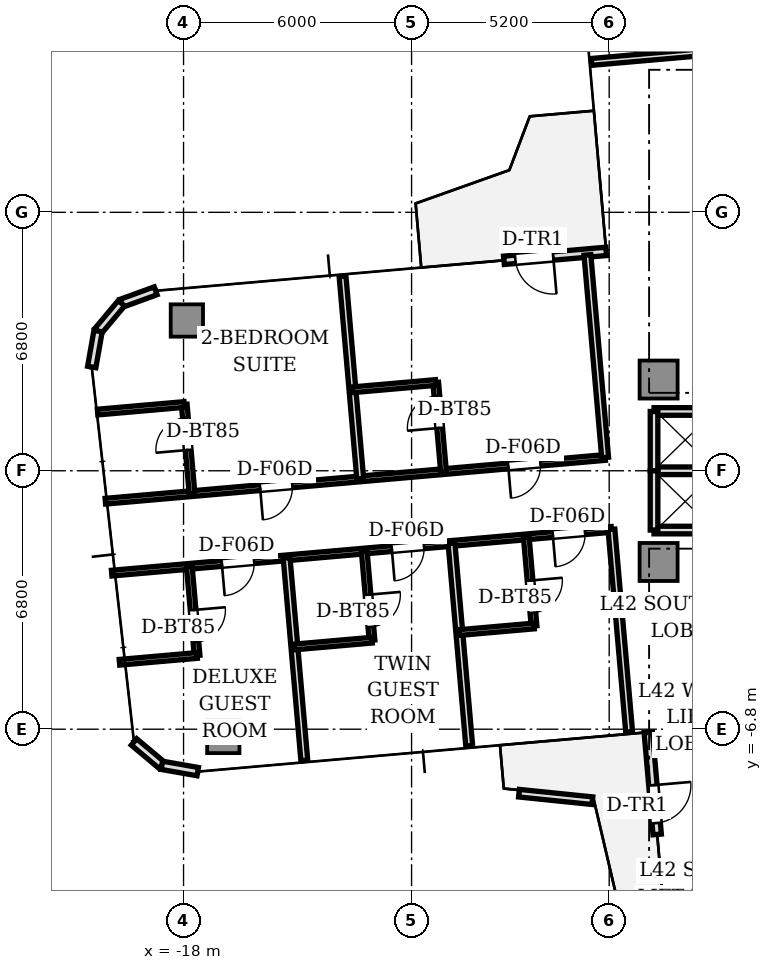
"""IFC4 building model, lengths in metres.
Left out: names, types, materials, properties, quantities, classifications, styles, units other than length and angle.
Written with IfcOpenShell. Run it as: python <this file> out.ifc"""

import sys

from ifc_helpers import new_model, si_unit, direction, frame, frame_2d, origin, origin_2d, place, context, subcontext, project, spatial, rectangle, extrude, source, transform, mapped, element, fill, save


model = new_model("IFC4")
c1 = context("Model", 3, precision=1e-05, world=origin(), true_north=direction((0.0, 1.0)))
c2 = subcontext(c1, "Body", "Model", "MODEL_VIEW")
j1 = project(units=[si_unit("LENGTHUNIT", "METRE"), si_unit("PLANEANGLEUNIT", "RADIAN")], contexts=[c1])
p1 = place(None, origin())
s1 = spatial("IfcSite", under=j1, at=p1, CompositionType="ELEMENT")
p2 = place(p1, origin())
s2 = spatial("IfcBuilding", under=s1, at=p2, CompositionType="ELEMENT")
p3 = place(p2, frame((0.0, 0.0, 153.95)))
s3 = spatial("IfcBuildingStorey", under=s2, at=p3, CompositionType="ELEMENT", Elevation=153.95)
m1 = source(origin(), c2, "Body", "SweptSolid", [
    extrude(rectangle(XDim=1.0, YDim=1.0, at=origin_2d()), origin(), (0.0, 0.0, 1.0), 3.11),
])
for number, where, z_axis, x_axis in (
    (1, (-5.5, 2.4, 0.0), (0.0, 0.0, 1.0), (1.0, 0.0, 0.0)),
    (2, (-5.5, -2.4, 0.0), (0.0, 0.0, 1.0), (1.0, 0.0, 0.0)),
):
    element("IfcColumn", number, at=place(p3, frame(where, z_axis=z_axis, x_axis=x_axis)), inside=s3, PredefinedType="COLUMN", context=c2, shape_type="MappedRepresentation", body=[
        mapped(m1, transform((0.0, 0.0, 0.0), scale=1.0)),
    ])
m2 = source(origin(), c2, "Body", "SweptSolid", [
    extrude(rectangle(XDim=0.85, YDim=0.85, at=origin_2d()), origin(), (0.0, 0.0, 1.0), 3.11),
])
for number, where, z_axis, x_axis in (
    (3, (-17.913, 3.954, 0.0), (0.0, 0.0, 1.0), (1.0, 0.0, 0.0)),
    (4, (-16.954, -7.004, 0.0), (0.0, 0.0, 1.0), (1.0, 0.0, 0.0)),
):
    element("IfcColumn", number, at=place(p3, frame(where, z_axis=z_axis, x_axis=x_axis)), inside=s3, PredefinedType="COLUMN", context=c2, shape_type="MappedRepresentation", body=[
        mapped(m2, transform((0.0, 0.0, 0.0), scale=1.0)),
    ])
p4 = place(p3, frame((-6.879, 5.772, 0.0), z_axis=(0.0, 0.0, 1.0), x_axis=(-0.996193619346, -0.087168071984, 0.0)))
e5 = element("IfcWall", 5, at=p4, inside=s3, PredefinedType="STANDARD", context=c2, shape_type="SweptSolid", body=[
    extrude(rectangle(XDim=2.7, YDim=0.22, at=frame_2d((1.35, 0.0))), origin(), (0.0, 0.0, 1.0), 3.11),
])
p5 = place(p4, frame((1.4, 0.0, 0.0)))
e6 = element("IfcOpeningElement", 6, at=p5, cuts=e5, PredefinedType="OPENING", context=c2, shape_type="SweptSolid", body=[
    extrude(rectangle(XDim=1.0, YDim=2.2, at=frame_2d((0.5, 1.1))), frame((0.0, 0.12, 0.0), z_axis=(0.0, -1.0, 0.0), x_axis=(1.0, 0.0, 0.0)), (0.0, 0.0, 1.0), 0.24),
])
p6 = place(p3, frame((-18.734, 4.735, 0.0), z_axis=(0.0, 0.0, 1.0), x_axis=(-0.939741306239, -0.34188635151, 0.0)))
e7 = element("IfcWall", 7, at=p6, inside=s3, PredefinedType="STANDARD", context=c2, shape_type="SweptSolid", body=[
    extrude(rectangle(XDim=0.958, YDim=0.22, at=frame_2d((0.479, 0.0))), origin(), (0.0, 0.0, 1.0), 3.11),
])
for number, where, z_axis, x_axis in (
    (8, (-19.634, 4.408, 0.0), (0.0, 0.0, 1.0), (-0.643, -0.766, 0.0)),
    (9, (-20.25, 3.674, 0.0), (0.0, 0.0, 1.0), (-0.174, -0.985, 0.0)),
):
    element("IfcWall", number, at=place(p3, frame(where, z_axis=z_axis, x_axis=x_axis)), inside=s3, PredefinedType="STANDARD", context=c2, shape_type="SweptSolid", body=[
        extrude(rectangle(XDim=0.958, YDim=0.22, at=frame_2d((0.479, 0.0))), origin(), (0.0, 0.0, 1.0), 3.11),
    ])
p7 = place(p3, frame((-19.304, -7.135, 0.0), z_axis=(0.0, 0.0, 1.0), x_axis=(0.766001159887, -0.642839189107, 0.0)))
e10 = element("IfcWall", 10, at=p7, inside=s3, PredefinedType="STANDARD", context=c2, shape_type="SweptSolid", body=[
    extrude(rectangle(XDim=0.958, YDim=0.22, at=frame_2d((0.479, 0.0))), origin(), (0.0, 0.0, 1.0), 3.11),
])
p8 = place(p3, frame((-18.57, -7.75, 0.0), z_axis=(0.0, 0.0, 1.0), x_axis=(0.984770724397, -0.173858046606, 0.0)))
e11 = element("IfcWall", 11, at=p8, inside=s3, PredefinedType="STANDARD", context=c2, shape_type="SweptSolid", body=[
    extrude(rectangle(XDim=0.958, YDim=0.22, at=frame_2d((0.479, 0.0))), origin(), (0.0, 0.0, 1.0), 3.11),
])
p9 = place(p3, frame((-5.772, -6.879, 0.0), z_axis=(0.0, 0.0, 1.0), x_axis=(0.087168071984, -0.996193619346, 0.0)))
e12 = element("IfcWall", 12, at=p9, inside=s3, PredefinedType="STANDARD", context=c2, shape_type="SweptSolid", body=[
    extrude(rectangle(XDim=2.7, YDim=0.22, at=frame_2d((1.35, 0.0))), origin(), (0.0, 0.0, 1.0), 3.11),
])
p10 = place(p9, frame((1.4, 0.0, 0.0)))
e13 = element("IfcOpeningElement", 13, at=p10, cuts=e12, PredefinedType="OPENING", context=c2, shape_type="SweptSolid", body=[
    extrude(rectangle(XDim=1.0, YDim=2.2, at=frame_2d((0.5, 1.1))), frame((0.0, 0.12, 0.0), z_axis=(0.0, -1.0, 0.0), x_axis=(1.0, 0.0, 0.0)), (0.0, 0.0, 1.0), 0.24),
])
p11 = place(p3, frame((-9.174, -8.484, 0.0), z_axis=(0.0, 0.0, 1.0), x_axis=(0.994814431637, -0.101706669429, 0.0)))
e14 = element("IfcWall", 14, at=p11, inside=s3, PredefinedType="PARAPET", context=c2, shape_type="SweptSolid", body=[
    extrude(rectangle(XDim=1.942, YDim=0.2, at=frame_2d((0.971, 0.0))), origin(), (0.0, 0.0, 1.0), 0.65),
])
for number, where, z_axis, x_axis in (
    (15, (-5.62, 1.56, 0.0), (0.0, 0.0, 1.0), (1.0, 0.0, 0.0)),
    (16, (-5.62, -1.56, 0.0), (0.0, 0.0, 1.0), (1.0, 0.0, 0.0)),
    (17, (-5.62, 0.0, 0.0), (0.0, 0.0, 1.0), (1.0, 0.0, 0.0)),
):
    element("IfcWall", number, at=place(p3, frame(where, z_axis=z_axis, x_axis=x_axis)), inside=s3, PredefinedType="SOLIDWALL", context=c2, shape_type="SweptSolid", body=[
        extrude(rectangle(XDim=1.64, YDim=0.2, at=frame_2d((0.82, 0.0))), origin(), (0.0, 0.0, 1.0), 2.66),
    ])
for number, where, z_axis, x_axis in (
    (18, (-5.62, 0.0, 0.0), (0.0, 0.0, 1.0), (0.0, 1.0, 0.0)),
    (19, (-5.62, -1.56, 0.0), (0.0, 0.0, 1.0), (0.0, 1.0, 0.0)),
):
    element("IfcWall", number, at=place(p3, frame(where, z_axis=z_axis, x_axis=x_axis)), inside=s3, PredefinedType="SOLIDWALL", context=c2, shape_type="SweptSolid", body=[
        extrude(rectangle(XDim=1.56, YDim=0.2, at=frame_2d((0.78, 0.0))), origin(), (0.0, 0.0, 1.0), 2.66),
    ])
p12 = place(p3, frame((-1.936, 11.224, 0.0), z_axis=(0.0, 0.0, 1.0), x_axis=(-0.996194212812, -0.087161289348, 0.0)))
e20 = element("IfcWall", 20, at=p12, inside=s3, PredefinedType="PARTITIONING", context=c2, shape_type="SweptSolid", body=[
    extrude(rectangle(XDim=5.35, YDim=0.18, at=frame_2d((2.675, 0.0))), origin(), (0.0, 0.0, 1.0), 2.66),
])
p13 = place(p3, frame((-6.741, -1.543, 0.0), z_axis=(0.0, 0.0, 1.0), x_axis=(-0.996195062465, -0.087151577845, 0.0)))
e21 = element("IfcWall", 21, at=p13, inside=s3, PredefinedType="PARTITIONING", context=c2, shape_type="SweptSolid", body=[
    extrude(rectangle(XDim=13.2, YDim=0.15, at=frame_2d((6.6, 0.0))), origin(), (0.0, 0.0, 1.0), 2.66),
])
p14 = place(p13, frame((0.7, 0.0, 0.0)))
e22 = element("IfcOpeningElement", 22, at=p14, cuts=e21, PredefinedType="OPENING", context=c2, shape_type="SweptSolid", body=[
    extrude(rectangle(XDim=0.85, YDim=2.1, at=frame_2d((0.425, 1.05))), frame((0.0, 0.085, 0.0), z_axis=(0.0, -1.0, 0.0), x_axis=(1.0, 0.0, 0.0)), (0.0, 0.0, 1.0), 0.17),
])
p15 = place(p13, frame((4.952, 0.0, 0.0)))
e23 = element("IfcOpeningElement", 23, at=p15, cuts=e21, PredefinedType="OPENING", context=c2, shape_type="SweptSolid", body=[
    extrude(rectangle(XDim=0.85, YDim=2.1, at=frame_2d((0.425, 1.05))), frame((0.0, 0.085, 0.0), z_axis=(0.0, -1.0, 0.0), x_axis=(1.0, 0.0, 0.0)), (0.0, 0.0, 1.0), 0.17),
])
p16 = place(p13, frame((9.44, 0.0, 0.0)))
e24 = element("IfcOpeningElement", 24, at=p16, cuts=e21, PredefinedType="OPENING", context=c2, shape_type="SweptSolid", body=[
    extrude(rectangle(XDim=0.85, YDim=2.1, at=frame_2d((0.425, 1.05))), frame((0.0, 0.085, 0.0), z_axis=(0.0, -1.0, 0.0), x_axis=(1.0, 0.0, 0.0)), (0.0, 0.0, 1.0), 0.17),
])
p17 = place(p3, frame((-6.907, 0.349, 0.0), z_axis=(0.0, 0.0, 1.0), x_axis=(-0.996195062465, -0.087151577845, 0.0)))
e25 = element("IfcWall", 25, at=p17, inside=s3, PredefinedType="PARTITIONING", context=c2, shape_type="SweptSolid", body=[
    extrude(rectangle(XDim=13.2, YDim=0.15, at=frame_2d((6.6, 0.0))), origin(), (0.0, 0.0, 1.0), 2.66),
])
p18 = place(p17, frame((1.71, 0.0, 0.0)))
e26 = element("IfcOpeningElement", 26, at=p18, cuts=e25, PredefinedType="OPENING", context=c2, shape_type="SweptSolid", body=[
    extrude(rectangle(XDim=0.85, YDim=2.1, at=frame_2d((0.425, 1.05))), frame((0.0, 0.085, 0.0), z_axis=(0.0, -1.0, 0.0), x_axis=(1.0, 0.0, 0.0)), (0.0, 0.0, 1.0), 0.17),
])
p19 = place(p17, frame((8.264, 0.0, 0.0)))
e27 = element("IfcOpeningElement", 27, at=p19, cuts=e25, PredefinedType="OPENING", context=c2, shape_type="SweptSolid", body=[
    extrude(rectangle(XDim=0.85, YDim=2.1, at=frame_2d((0.425, 1.05))), frame((0.0, 0.085, 0.0), z_axis=(0.0, -1.0, 0.0), x_axis=(1.0, 0.0, 0.0)), (0.0, 0.0, 1.0), 0.17),
])
for number, where, z_axis, x_axis in (
    (28, (-6.741, -1.543, 0.0), (0.0, 0.0, 1.0), (0.087, -0.996, 0.0)),
    (29, (-7.373, 5.679, 0.0), (0.0, 0.0, 1.0), (0.087, -0.996, 0.0)),
    (30, (-10.949, -1.912, 0.0), (0.0, 0.0, 1.0), (0.087, -0.996, 0.0)),
):
    element("IfcWall", number, at=place(p3, frame(where, z_axis=z_axis, x_axis=x_axis)), inside=s3, PredefinedType="PARTITIONING", context=c2, shape_type="SweptSolid", body=[
        extrude(rectangle(XDim=5.35, YDim=0.18, at=frame_2d((2.675, 0.0))), origin(), (0.0, 0.0, 1.0), 2.66),
    ])
p20 = place(p3, frame((-8.983, -1.74, 0.0), z_axis=(0.0, 0.0, 1.0), x_axis=(0.087224846905, -0.996188649846, 0.0)))
e31 = element("IfcWall", 31, at=p20, inside=s3, PredefinedType="PARTITIONING", context=c2, shape_type="SweptSolid", body=[
    extrude(rectangle(XDim=2.354, YDim=0.15, at=frame_2d((1.177, 0.0))), origin(), (0.0, 0.0, 1.0), 2.66),
])
p21 = place(p20, frame((1.154, 0.0, 0.0)))
e32 = element("IfcOpeningElement", 32, at=p21, cuts=e31, PredefinedType="OPENING", context=c2, shape_type="SweptSolid", body=[
    extrude(rectangle(XDim=0.85, YDim=2.1, at=frame_2d((0.425, 1.05))), frame((0.0, 0.085, 0.0), z_axis=(0.0, -1.0, 0.0), x_axis=(1.0, 0.0, 0.0)), (0.0, 0.0, 1.0), 0.17),
])
p22 = place(p3, frame((-8.777, -4.084, 0.0), z_axis=(0.0, 0.0, 1.0), x_axis=(-0.996191703625, -0.087189962887, 0.0)))
e33 = element("IfcWall", 33, at=p22, inside=s3, PredefinedType="PARTITIONING", context=c2, shape_type="SweptSolid", body=[
    extrude(rectangle(XDim=1.974, YDim=0.15, at=frame_2d((0.987, 0.0))), origin(), (0.0, 0.0, 1.0), 2.66),
])
p23 = place(p3, frame((-15.289, -2.291, 0.0), z_axis=(0.0, 0.0, 1.0), x_axis=(0.087161289348, -0.996194212812, 0.0)))
e34 = element("IfcWall", 34, at=p23, inside=s3, PredefinedType="PARTITIONING", context=c2, shape_type="SweptSolid", body=[
    extrude(rectangle(XDim=5.35, YDim=0.18, at=frame_2d((2.675, 0.0))), origin(), (0.0, 0.0, 1.0), 2.66),
])
p24 = place(p3, frame((-13.246, -2.113, 0.0), z_axis=(0.0, 0.0, 1.0), x_axis=(0.087224846905, -0.996188649846, 0.0)))
e35 = element("IfcWall", 35, at=p24, inside=s3, PredefinedType="PARTITIONING", context=c2, shape_type="SweptSolid", body=[
    extrude(rectangle(XDim=2.354, YDim=0.15, at=frame_2d((1.177, 0.0))), origin(), (0.0, 0.0, 1.0), 2.66),
])
p25 = place(p24, frame((1.154, 0.0, 0.0)))
e36 = element("IfcOpeningElement", 36, at=p25, cuts=e35, PredefinedType="OPENING", context=c2, shape_type="SweptSolid", body=[
    extrude(rectangle(XDim=0.85, YDim=2.1, at=frame_2d((0.425, 1.05))), frame((0.0, 0.085, 0.0), z_axis=(0.0, -1.0, 0.0), x_axis=(1.0, 0.0, 0.0)), (0.0, 0.0, 1.0), 0.17),
])
p26 = place(p3, frame((-13.041, -4.458, 0.0), z_axis=(0.0, 0.0, 1.0), x_axis=(-0.99619307114, -0.087174336889, 0.0)))
e37 = element("IfcWall", 37, at=p26, inside=s3, PredefinedType="PARTITIONING", context=c2, shape_type="SweptSolid", body=[
    extrude(rectangle(XDim=2.05, YDim=0.15, at=frame_2d((1.025, 0.0))), origin(), (0.0, 0.0, 1.0), 2.66),
])
p27 = place(p3, frame((-17.849, -2.515, 0.0), z_axis=(0.0, 0.0, 1.0), x_axis=(0.087121918963, -0.996197656711, 0.0)))
e38 = element("IfcWall", 38, at=p27, inside=s3, PredefinedType="PARTITIONING", context=c2, shape_type="SweptSolid", body=[
    extrude(rectangle(XDim=2.354, YDim=0.15, at=frame_2d((1.177, 0.0))), origin(), (0.0, 0.0, 1.0), 2.66),
])
p28 = place(p27, frame((1.154, 0.0, 0.0)))
e39 = element("IfcOpeningElement", 39, at=p28, cuts=e38, PredefinedType="OPENING", context=c2, shape_type="SweptSolid", body=[
    extrude(rectangle(XDim=0.85, YDim=2.1, at=frame_2d((0.425, 1.05))), frame((0.0, 0.085, 0.0), z_axis=(0.0, -1.0, 0.0), x_axis=(1.0, 0.0, 0.0)), (0.0, 0.0, 1.0), 0.17),
])
p29 = place(p3, frame((-17.644, -4.86, 0.0), z_axis=(0.0, 0.0, 1.0), x_axis=(-0.99619307114, -0.087174336889, 0.0)))
e40 = element("IfcWall", 40, at=p29, inside=s3, PredefinedType="PARTITIONING", context=c2, shape_type="SweptSolid", body=[
    extrude(rectangle(XDim=2.05, YDim=0.15, at=frame_2d((1.025, 0.0))), origin(), (0.0, 0.0, 1.0), 2.66),
])
p30 = place(p3, frame((-13.35, -0.214, 0.0), z_axis=(0.0, 0.0, 1.0), x_axis=(-0.087161289348, 0.996194212812, 0.0)))
e41 = element("IfcWall", 41, at=p30, inside=s3, PredefinedType="PARTITIONING", context=c2, shape_type="SweptSolid", body=[
    extrude(rectangle(XDim=5.35, YDim=0.18, at=frame_2d((2.675, 0.0))), origin(), (0.0, 0.0, 1.0), 2.66),
])
p31 = place(p3, frame((-11.159, -0.023, 0.0), z_axis=(0.0, 0.0, 1.0), x_axis=(-0.087224846905, 0.996188649846, 0.0)))
e42 = element("IfcWall", 42, at=p31, inside=s3, PredefinedType="PARTITIONING", context=c2, shape_type="SweptSolid", body=[
    extrude(rectangle(XDim=2.354, YDim=0.15, at=frame_2d((1.177, 0.0))), origin(), (0.0, 0.0, 1.0), 2.66),
])
p32 = place(p31, frame((1.154, 0.0, 0.0)))
e43 = element("IfcOpeningElement", 43, at=p32, cuts=e42, PredefinedType="OPENING", context=c2, shape_type="SweptSolid", body=[
    extrude(rectangle(XDim=0.85, YDim=2.1, at=frame_2d((0.425, 1.05))), frame((0.0, 0.085, 0.0), z_axis=(0.0, -1.0, 0.0), x_axis=(1.0, 0.0, 0.0)), (0.0, 0.0, 1.0), 0.17),
])
p33 = place(p3, frame((-11.365, 2.322, 0.0), z_axis=(0.0, 0.0, 1.0), x_axis=(-0.996195042958, -0.087151800816, 0.0)))
e44 = element("IfcWall", 44, at=p33, inside=s3, PredefinedType="PARTITIONING", context=c2, shape_type="SweptSolid", body=[
    extrude(rectangle(XDim=2.199, YDim=0.15, at=frame_2d((1.1, 0.0))), origin(), (0.0, 0.0, 1.0), 2.66),
])
p34 = place(p3, frame((-17.776, -0.602, 0.0), z_axis=(0.0, 0.0, 1.0), x_axis=(-0.087224846905, 0.996188649846, 0.0)))
e45 = element("IfcWall", 45, at=p34, inside=s3, PredefinedType="PARTITIONING", context=c2, shape_type="SweptSolid", body=[
    extrude(rectangle(XDim=2.354, YDim=0.15, at=frame_2d((1.177, 0.0))), origin(), (0.0, 0.0, 1.0), 2.63),
])
p35 = place(p34, frame((1.154, 0.0, 0.0)))
e46 = element("IfcOpeningElement", 46, at=p35, cuts=e45, PredefinedType="OPENING", context=c2, shape_type="SweptSolid", body=[
    extrude(rectangle(XDim=0.85, YDim=2.1, at=frame_2d((0.425, 1.05))), frame((0.0, 0.085, 0.0), z_axis=(0.0, -1.0, 0.0), x_axis=(1.0, 0.0, 0.0)), (0.0, 0.0, 1.0), 0.17),
])
p36 = place(p3, frame((-17.981, 1.743, 0.0), z_axis=(0.0, 0.0, 1.0), x_axis=(-0.996196032585, -0.087140488075, 0.0)))
e47 = element("IfcWall", 47, at=p36, inside=s3, PredefinedType="PARTITIONING", context=c2, shape_type="SweptSolid", body=[
    extrude(rectangle(XDim=2.289, YDim=0.15, at=frame_2d((1.145, 0.0))), origin(), (0.0, 0.0, 1.0), 2.66),
])
p37 = place(p3, frame((-5.287, -11.856, 0.0), z_axis=(0.0, 0.0, 1.0), x_axis=(0.996194790044, 0.087154691724, 0.0)))
e48 = element("IfcWall", 48, at=p37, inside=s3, PredefinedType="PARTITIONING", context=c2, shape_type="SweptSolid", body=[
    extrude(rectangle(XDim=12.6, YDim=0.15, at=frame_2d((6.3, 0.0))), origin(), (0.0, 0.0, 1.0), 2.66),
])
p38 = place(p37, frame((5.5, 0.0, 0.0)))
e49 = element("IfcOpeningElement", 49, at=p38, cuts=e48, PredefinedType="OPENING", context=c2, shape_type="SweptSolid", body=[
    extrude(rectangle(XDim=1.6, YDim=2.25, at=frame_2d((0.8, 1.125))), frame((0.0, 0.085, 0.0), z_axis=(0.0, -1.0, 0.0), x_axis=(1.0, 0.0, 0.0)), (0.0, 0.0, 1.0), 0.17),
])
m3 = source(origin(), c2, "Body", "SweptSolid", [
    extrude(rectangle(XDim=1.0, YDim=0.05, at=origin_2d()), origin(), (0.0, 0.0, 1.0), 2.2),
])
p39 = place(p5, frame((0.5, 0.0, 0.0)))
e50 = element("IfcDoor", 50, at=p39, inside=s3, OperationType="SINGLE_SWING_LEFT", PredefinedType="DOOR", context=c2, shape_type="MappedRepresentation", body=[
    mapped(m3, transform((0.0, 0.0, 0.0), scale=1.0)),
])
fill(e6, e50)
p40 = place(p10, frame((0.5, 0.0, 0.0)))
e51 = element("IfcDoor", 51, at=p40, inside=s3, OperationType="SINGLE_SWING_LEFT", PredefinedType="DOOR", context=c2, shape_type="MappedRepresentation", body=[
    mapped(m3, transform((0.0, 0.0, 0.0), scale=1.0)),
])
fill(e13, e51)
m4 = source(origin(), c2, "Body", "SweptSolid", [
    extrude(rectangle(XDim=0.85, YDim=0.05, at=origin_2d()), origin(), (0.0, 0.0, 1.0), 2.1),
])
p41 = place(p21, frame((0.425, 0.0, 0.0)))
e52 = element("IfcDoor", 52, at=p41, inside=s3, OperationType="SINGLE_SWING_LEFT", PredefinedType="DOOR", context=c2, shape_type="MappedRepresentation", body=[
    mapped(m4, transform((0.0, 0.0, 0.0), scale=1.0)),
])
fill(e32, e52)
p42 = place(p14, frame((0.425, 0.0, 0.0)))
e53 = element("IfcDoor", 53, at=p42, inside=s3, OperationType="SINGLE_SWING_RIGHT", PredefinedType="DOOR", context=c2, shape_type="MappedRepresentation", body=[
    mapped(m4, transform((0.0, 0.0, 0.0), scale=1.0)),
])
fill(e22, e53)
p43 = place(p25, frame((0.425, 0.0, 0.0)))
e54 = element("IfcDoor", 54, at=p43, inside=s3, OperationType="SINGLE_SWING_LEFT", PredefinedType="DOOR", context=c2, shape_type="MappedRepresentation", body=[
    mapped(m4, transform((0.0, 0.0, 0.0), scale=1.0)),
])
fill(e36, e54)
p44 = place(p15, frame((0.425, 0.0, 0.0)))
e55 = element("IfcDoor", 55, at=p44, inside=s3, OperationType="SINGLE_SWING_RIGHT", PredefinedType="DOOR", context=c2, shape_type="MappedRepresentation", body=[
    mapped(m4, transform((0.0, 0.0, 0.0), scale=1.0)),
])
fill(e23, e55)
p45 = place(p28, frame((0.425, 0.0, 0.0)))
e56 = element("IfcDoor", 56, at=p45, inside=s3, OperationType="SINGLE_SWING_LEFT", PredefinedType="DOOR", context=c2, shape_type="MappedRepresentation", body=[
    mapped(m4, transform((0.0, 0.0, 0.0), scale=1.0)),
])
fill(e39, e56)
p46 = place(p16, frame((0.425, 0.0, 0.0)))
e57 = element("IfcDoor", 57, at=p46, inside=s3, OperationType="SINGLE_SWING_RIGHT", PredefinedType="DOOR", context=c2, shape_type="MappedRepresentation", body=[
    mapped(m4, transform((0.0, 0.0, 0.0), scale=1.0)),
])
fill(e24, e57)
p47 = place(p32, frame((0.425, 0.0, 0.0)))
e58 = element("IfcDoor", 58, at=p47, inside=s3, OperationType="SINGLE_SWING_LEFT", PredefinedType="DOOR", context=c2, shape_type="MappedRepresentation", body=[
    mapped(m4, transform((0.0, 0.0, 0.0), scale=1.0)),
])
fill(e43, e58)
p48 = place(p18, frame((0.425, 0.0, 0.0)))
e59 = element("IfcDoor", 59, at=p48, inside=s3, OperationType="SINGLE_SWING_RIGHT", PredefinedType="DOOR", context=c2, shape_type="MappedRepresentation", body=[
    mapped(m4, transform((0.0, 0.0, 0.0), scale=1.0)),
])
fill(e26, e59)
p49 = place(p35, frame((0.425, 0.0, 0.0)))
e60 = element("IfcDoor", 60, at=p49, inside=s3, OperationType="SINGLE_SWING_LEFT", PredefinedType="DOOR", context=c2, shape_type="MappedRepresentation", body=[
    mapped(m4, transform((0.0, 0.0, 0.0), scale=1.0)),
])
fill(e46, e60)
p50 = place(p19, frame((0.425, 0.0, 0.0)))
e61 = element("IfcDoor", 61, at=p50, inside=s3, OperationType="SINGLE_SWING_RIGHT", PredefinedType="DOOR", context=c2, shape_type="MappedRepresentation", body=[
    mapped(m4, transform((0.0, 0.0, 0.0), scale=1.0)),
])
fill(e27, e61)
save(model, sys.argv[1])
